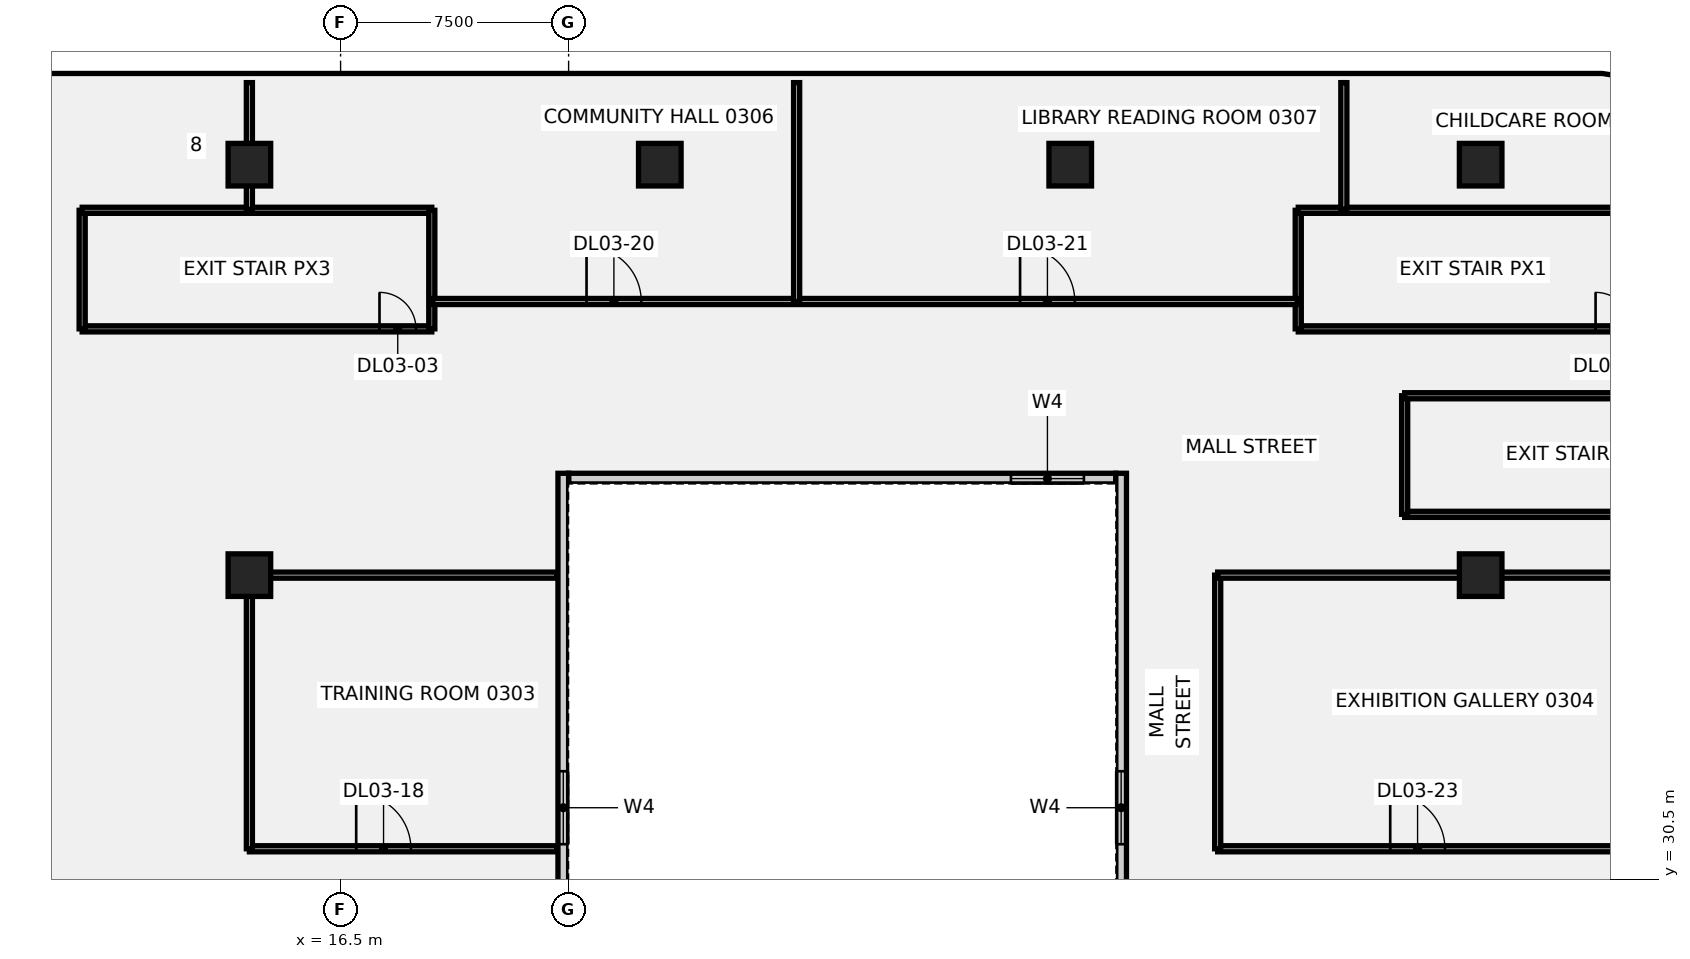
"""IFC4 building model, lengths in metres.
Left out: names, types, materials, properties, quantities, classifications, styles, units other than length and angle.
Written with IfcOpenShell. Run it as: python <this file> out.ifc"""

import sys

from ifc_helpers import new_model, si_unit, direction, frame, frame_2d, origin, origin_2d, place, context, subcontext, project, spatial, rectangle, extrude, element, fill, save


model = new_model("IFC4")
c1 = context("Model", 3, precision=1e-05, world=origin(), true_north=direction((0.0, 1.0)))
c2 = subcontext(c1, "Body", "Model", "MODEL_VIEW")
j1 = project(units=[si_unit("LENGTHUNIT", "METRE"), si_unit("PLANEANGLEUNIT", "RADIAN")], contexts=[c1])
p1 = place(None, origin())
s1 = spatial("IfcSite", under=j1, at=p1, CompositionType="ELEMENT")
p2 = place(p1, origin())
s2 = spatial("IfcBuilding", under=s1, at=p2, CompositionType="ELEMENT")
p3 = place(p2, frame((0.0, 0.0, 20.0)))
s3 = spatial("IfcBuildingStorey", under=s2, at=p3, CompositionType="ELEMENT", Elevation=20.0)
for number, where, z_axis, x_axis in (
    (1, (13.5, 40.5, -0.5), (0.0, 0.0, 1.0), (1.0, 0.0, 0.0)),
    (2, (13.5, 54.0, -0.5), (0.0, 0.0, 1.0), (1.0, 0.0, 0.0)),
    (3, (27.0, 54.0, -0.5), (0.0, 0.0, 1.0), (1.0, 0.0, 0.0)),
    (4, (40.5, 54.0, -0.5), (0.0, 0.0, 1.0), (1.0, 0.0, 0.0)),
    (5, (54.0, 40.5, -0.5), (0.0, 0.0, 1.0), (1.0, 0.0, 0.0)),
    (6, (54.0, 54.0, -0.5), (0.0, 0.0, 1.0), (1.0, 0.0, 0.0)),
):
    element("IfcColumn", number, at=place(p3, frame(where, z_axis=z_axis, x_axis=x_axis)), inside=s3, PredefinedType="COLUMN", context=c2, shape_type="SweptSolid", body=[
        extrude(rectangle(XDim=1.4, YDim=1.4, at=origin_2d()), origin(), (0.0, 0.0, 1.0), 5.05),
    ])
p4 = place(p3, frame((8.0, 48.6, 0.0), z_axis=(0.0, 0.0, 1.0), x_axis=(1.0, 0.0, 0.0)))
e7 = element("IfcWall", 7, at=p4, inside=s3, PredefinedType="PARTITIONING", context=c2, shape_type="SweptSolid", body=[
    extrude(rectangle(XDim=11.5, YDim=0.2, at=frame_2d((5.75, 0.0))), origin(), (0.0, 0.0, 1.0), 4.55),
])
p5 = place(p4, frame((9.78, 0.0, 0.0)))
e8 = element("IfcOpeningElement", 8, at=p5, cuts=e7, PredefinedType="OPENING", context=c2, shape_type="SweptSolid", body=[
    extrude(rectangle(XDim=1.2, YDim=2.1, at=frame_2d((0.6, 1.05))), frame((0.0, 0.11, 0.0), z_axis=(0.0, -1.0, 0.0), x_axis=(1.0, 0.0, 0.0)), (0.0, 0.0, 1.0), 0.22),
])
p6 = place(p3, frame((8.0, 48.6, 0.0), z_axis=(0.0, 0.0, 1.0), x_axis=(0.0, 1.0, 0.0)))
e9 = element("IfcWall", 9, at=p6, inside=s3, PredefinedType="PARTITIONING", context=c2, shape_type="SweptSolid", body=[
    extrude(rectangle(XDim=3.9, YDim=0.2, at=frame_2d((1.95, 0.0))), origin(), (0.0, 0.0, 1.0), 4.55),
])
p7 = place(p3, frame((8.0, 52.5, 0.0), z_axis=(0.0, 0.0, 1.0), x_axis=(1.0, 0.0, 0.0)))
e10 = element("IfcWall", 10, at=p7, inside=s3, PredefinedType="PARTITIONING", context=c2, shape_type="SweptSolid", body=[
    extrude(rectangle(XDim=11.5, YDim=0.2, at=frame_2d((5.75, 0.0))), origin(), (0.0, 0.0, 1.0), 4.55),
])
p8 = place(p3, frame((19.5, 48.6, 0.0), z_axis=(0.0, 0.0, 1.0), x_axis=(0.0, 1.0, 0.0)))
e11 = element("IfcWall", 11, at=p8, inside=s3, PredefinedType="PARTITIONING", context=c2, shape_type="SweptSolid", body=[
    extrude(rectangle(XDim=3.9, YDim=0.2, at=frame_2d((1.95, 0.0))), origin(), (0.0, 0.0, 1.0), 4.55),
])
p9 = place(p3, frame((48.0, 48.6, 0.0), z_axis=(0.0, 0.0, 1.0), x_axis=(1.0, 0.0, 0.0)))
e12 = element("IfcWall", 12, at=p9, inside=s3, PredefinedType="PARTITIONING", context=c2, shape_type="SweptSolid", body=[
    extrude(rectangle(XDim=11.5, YDim=0.2, at=frame_2d((5.75, 0.0))), origin(), (0.0, 0.0, 1.0), 4.55),
])
p10 = place(p9, frame((9.78, 0.0, 0.0)))
e13 = element("IfcOpeningElement", 13, at=p10, cuts=e12, PredefinedType="OPENING", context=c2, shape_type="SweptSolid", body=[
    extrude(rectangle(XDim=1.2, YDim=2.1, at=frame_2d((0.6, 1.05))), frame((0.0, 0.11, 0.0), z_axis=(0.0, -1.0, 0.0), x_axis=(1.0, 0.0, 0.0)), (0.0, 0.0, 1.0), 0.22),
])
p11 = place(p3, frame((48.0, 48.6, 0.0), z_axis=(0.0, 0.0, 1.0), x_axis=(0.0, 1.0, 0.0)))
e14 = element("IfcWall", 14, at=p11, inside=s3, PredefinedType="PARTITIONING", context=c2, shape_type="SweptSolid", body=[
    extrude(rectangle(XDim=3.9, YDim=0.2, at=frame_2d((1.95, 0.0))), origin(), (0.0, 0.0, 1.0), 4.55),
])
for number, where, z_axis, x_axis in (
    (15, (48.0, 52.5, 0.0), (0.0, 0.0, 1.0), (1.0, 0.0, 0.0)),
    (16, (51.5, 42.5, 0.0), (0.0, 0.0, 1.0), (1.0, 0.0, 0.0)),
):
    element("IfcWall", number, at=place(p3, frame(where, z_axis=z_axis, x_axis=x_axis)), inside=s3, PredefinedType="PARTITIONING", context=c2, shape_type="SweptSolid", body=[
        extrude(rectangle(XDim=11.5, YDim=0.2, at=frame_2d((5.75, 0.0))), origin(), (0.0, 0.0, 1.0), 4.55),
    ])
p12 = place(p3, frame((51.5, 42.5, 0.0), z_axis=(0.0, 0.0, 1.0), x_axis=(0.0, 1.0, 0.0)))
e17 = element("IfcWall", 17, at=p12, inside=s3, PredefinedType="PARTITIONING", context=c2, shape_type="SweptSolid", body=[
    extrude(rectangle(XDim=3.9, YDim=0.2, at=frame_2d((1.95, 0.0))), origin(), (0.0, 0.0, 1.0), 4.55),
])
p13 = place(p3, frame((51.5, 46.4, 0.0), z_axis=(0.0, 0.0, 1.0), x_axis=(1.0, 0.0, 0.0)))
e18 = element("IfcWall", 18, at=p13, inside=s3, PredefinedType="PARTITIONING", context=c2, shape_type="SweptSolid", body=[
    extrude(rectangle(XDim=11.5, YDim=0.2, at=frame_2d((5.75, 0.0))), origin(), (0.0, 0.0, 1.0), 4.55),
])
p14 = place(p3, frame((13.5, 52.53, 0.0), z_axis=(0.0, 0.0, 1.0), x_axis=(0.0, 1.0, 0.0)))
e19 = element("IfcWall", 19, at=p14, inside=s3, PredefinedType="PARTITIONING", context=c2, shape_type="SweptSolid", body=[
    extrude(rectangle(XDim=4.169, YDim=0.2, at=frame_2d((2.084, 0.0))), origin(), (0.0, 0.0, 1.0), 4.55),
])
p15 = place(p3, frame((19.53, 49.5, 0.0), z_axis=(0.0, 0.0, 1.0), x_axis=(1.0, 0.0, 0.0)))
e20 = element("IfcWall", 20, at=p15, inside=s3, PredefinedType="PARTITIONING", context=c2, shape_type="SweptSolid", body=[
    extrude(rectangle(XDim=28.44, YDim=0.2, at=frame_2d((14.22, 0.0))), origin(), (0.0, 0.0, 1.0), 4.55),
])
p16 = place(p15, frame((5.06, 0.0, 0.0)))
e21 = element("IfcOpeningElement", 21, at=p16, cuts=e20, PredefinedType="OPENING", context=c2, shape_type="SweptSolid", body=[
    extrude(rectangle(XDim=1.8, YDim=2.1, at=frame_2d((0.9, 1.05))), frame((0.0, 0.11, 0.0), z_axis=(0.0, -1.0, 0.0), x_axis=(1.0, 0.0, 0.0)), (0.0, 0.0, 1.0), 0.22),
])
p17 = place(p15, frame((19.32, 0.0, 0.0)))
e22 = element("IfcOpeningElement", 22, at=p17, cuts=e20, PredefinedType="OPENING", context=c2, shape_type="SweptSolid", body=[
    extrude(rectangle(XDim=1.8, YDim=2.1, at=frame_2d((0.9, 1.05))), frame((0.0, 0.11, 0.0), z_axis=(0.0, -1.0, 0.0), x_axis=(1.0, 0.0, 0.0)), (0.0, 0.0, 1.0), 0.22),
])
p18 = place(p3, frame((13.5, 31.5, 0.0), z_axis=(0.0, 0.0, 1.0), x_axis=(1.0, 0.0, 0.0)))
e23 = element("IfcWall", 23, at=p18, inside=s3, PredefinedType="PARTITIONING", context=c2, shape_type="SweptSolid", body=[
    extrude(rectangle(XDim=10.12, YDim=0.2, at=frame_2d((5.06, 0.0))), origin(), (0.0, 0.0, 1.0), 4.55),
])
p19 = place(p18, frame((3.513, 0.0, 0.0)))
e24 = element("IfcOpeningElement", 24, at=p19, cuts=e23, PredefinedType="OPENING", context=c2, shape_type="SweptSolid", body=[
    extrude(rectangle(XDim=1.8, YDim=2.1, at=frame_2d((0.9, 1.05))), frame((0.0, 0.11, 0.0), z_axis=(0.0, -1.0, 0.0), x_axis=(1.0, 0.0, 0.0)), (0.0, 0.0, 1.0), 0.22),
])
p20 = place(p3, frame((13.5, 31.5, 0.0), z_axis=(0.0, 0.0, 1.0), x_axis=(0.0, 1.0, 0.0)))
e25 = element("IfcWall", 25, at=p20, inside=s3, PredefinedType="PARTITIONING", context=c2, shape_type="SweptSolid", body=[
    extrude(rectangle(XDim=9.0, YDim=0.2, at=frame_2d((4.5, 0.0))), origin(), (0.0, 0.0, 1.0), 4.55),
])
p21 = place(p3, frame((13.5, 40.5, 0.0), z_axis=(0.0, 0.0, 1.0), x_axis=(1.0, 0.0, 0.0)))
e26 = element("IfcWall", 26, at=p21, inside=s3, PredefinedType="PARTITIONING", context=c2, shape_type="SweptSolid", body=[
    extrude(rectangle(XDim=10.12, YDim=0.2, at=frame_2d((5.06, 0.0))), origin(), (0.0, 0.0, 1.0), 4.55),
])
p22 = place(p3, frame((31.5, 49.5, 0.0), z_axis=(0.0, 0.0, 1.0), x_axis=(0.0, 1.0, 0.0)))
e27 = element("IfcWall", 27, at=p22, inside=s3, PredefinedType="PARTITIONING", context=c2, shape_type="SweptSolid", body=[
    extrude(rectangle(XDim=7.199, YDim=0.2, at=frame_2d((3.6, 0.0))), origin(), (0.0, 0.0, 1.0), 4.55),
])
p23 = place(p3, frame((49.5, 52.53, 0.0), z_axis=(0.0, 0.0, 1.0), x_axis=(0.0, 1.0, 0.0)))
e28 = element("IfcWall", 28, at=p23, inside=s3, PredefinedType="PARTITIONING", context=c2, shape_type="SweptSolid", body=[
    extrude(rectangle(XDim=4.169, YDim=0.2, at=frame_2d((2.084, 0.0))), origin(), (0.0, 0.0, 1.0), 4.55),
])
p24 = place(p3, frame((45.35, 31.5, 0.0), z_axis=(0.0, 0.0, 1.0), x_axis=(1.0, 0.0, 0.0)))
e29 = element("IfcWall", 29, at=p24, inside=s3, PredefinedType="PARTITIONING", context=c2, shape_type="SweptSolid", body=[
    extrude(rectangle(XDim=18.349, YDim=0.2, at=frame_2d((9.174, 0.0))), origin(), (0.0, 0.0, 1.0), 4.55),
])
p25 = place(p24, frame((14.85, 0.0, 0.0)))
e30 = element("IfcOpeningElement", 30, at=p25, cuts=e29, PredefinedType="OPENING", context=c2, shape_type="SweptSolid", body=[
    extrude(rectangle(XDim=1.8, YDim=2.1, at=frame_2d((0.9, 1.05))), frame((0.0, 0.11, 0.0), z_axis=(0.0, -1.0, 0.0), x_axis=(1.0, 0.0, 0.0)), (0.0, 0.0, 1.0), 0.22),
])
p26 = place(p24, frame((5.675, 0.0, 0.0)))
e31 = element("IfcOpeningElement", 31, at=p26, cuts=e29, PredefinedType="OPENING", context=c2, shape_type="SweptSolid", body=[
    extrude(rectangle(XDim=1.8, YDim=2.1, at=frame_2d((0.9, 1.05))), frame((0.0, 0.11, 0.0), z_axis=(0.0, -1.0, 0.0), x_axis=(1.0, 0.0, 0.0)), (0.0, 0.0, 1.0), 0.22),
])
p27 = place(p3, frame((45.35, 31.5, 0.0), z_axis=(0.0, 0.0, 1.0), x_axis=(0.0, 1.0, 0.0)))
e32 = element("IfcWall", 32, at=p27, inside=s3, PredefinedType="PARTITIONING", context=c2, shape_type="SweptSolid", body=[
    extrude(rectangle(XDim=9.0, YDim=0.2, at=frame_2d((4.5, 0.0))), origin(), (0.0, 0.0, 1.0), 4.55),
])
p28 = place(p3, frame((45.35, 40.5, 0.0), z_axis=(0.0, 0.0, 1.0), x_axis=(1.0, 0.0, 0.0)))
e33 = element("IfcWall", 33, at=p28, inside=s3, PredefinedType="PARTITIONING", context=c2, shape_type="SweptSolid", body=[
    extrude(rectangle(XDim=18.349, YDim=0.2, at=frame_2d((9.174, 0.0))), origin(), (0.0, 0.0, 1.0), 4.55),
])
p29 = place(p3, frame((24.0, 43.675, 0.0), z_axis=(0.0, 0.0, 1.0), x_axis=(1.0, 0.0, 0.0)))
e34 = element("IfcWall", 34, at=p29, inside=s3, PredefinedType="SOLIDWALL", context=c2, shape_type="SweptSolid", body=[
    extrude(rectangle(XDim=18.0, YDim=0.35, at=frame_2d((9.0, 0.0))), origin(), (0.0, 0.0, 1.0), 4.55),
])
p30 = place(p29, frame((14.55, 0.0, 1.0)))
e35 = element("IfcOpeningElement", 35, at=p30, cuts=e34, PredefinedType="OPENING", context=c2, shape_type="SweptSolid", body=[
    extrude(rectangle(XDim=2.4, YDim=1.8, at=frame_2d((1.2, 0.9))), frame((0.0, 0.185, 0.0), z_axis=(0.0, -1.0, 0.0), x_axis=(1.0, 0.0, 0.0)), (0.0, 0.0, 1.0), 0.37),
])
p31 = place(p3, frame((23.825, 16.45, 0.0), z_axis=(0.0, 0.0, 1.0), x_axis=(0.0, 1.0, 0.0)))
e36 = element("IfcWall", 36, at=p31, inside=s3, PredefinedType="SOLIDWALL", context=c2, shape_type="SweptSolid", body=[
    extrude(rectangle(XDim=27.4, YDim=0.35, at=frame_2d((13.7, 0.0))), origin(), (0.0, 0.0, 1.0), 4.55),
])
p32 = place(p31, frame((15.2, 0.0, 1.0)))
e37 = element("IfcOpeningElement", 37, at=p32, cuts=e36, PredefinedType="OPENING", context=c2, shape_type="SweptSolid", body=[
    extrude(rectangle(XDim=2.4, YDim=1.8, at=frame_2d((1.2, 0.9))), frame((0.0, 0.185, 0.0), z_axis=(0.0, -1.0, 0.0), x_axis=(1.0, 0.0, 0.0)), (0.0, 0.0, 1.0), 0.37),
])
p33 = place(p3, frame((42.175, 16.45, 0.0), z_axis=(0.0, 0.0, 1.0), x_axis=(0.0, 1.0, 0.0)))
e38 = element("IfcWall", 38, at=p33, inside=s3, PredefinedType="SOLIDWALL", context=c2, shape_type="SweptSolid", body=[
    extrude(rectangle(XDim=27.4, YDim=0.35, at=frame_2d((13.7, 0.0))), origin(), (0.0, 0.0, 1.0), 4.55),
])
p34 = place(p33, frame((15.2, 0.0, 1.0)))
e39 = element("IfcOpeningElement", 39, at=p34, cuts=e38, PredefinedType="OPENING", context=c2, shape_type="SweptSolid", body=[
    extrude(rectangle(XDim=2.4, YDim=1.8, at=frame_2d((1.2, 0.9))), frame((0.0, 0.185, 0.0), z_axis=(0.0, -1.0, 0.0), x_axis=(1.0, 0.0, 0.0)), (0.0, 0.0, 1.0), 0.37),
])
p35 = place(p10, origin())
e40 = element("IfcDoor", 40, at=p35, inside=s3, OperationType="SINGLE_SWING_LEFT", PredefinedType="DOOR", context=c2, shape_type="SweptSolid", body=[
    extrude(rectangle(XDim=1.2, YDim=2.1, at=frame_2d((0.6, 1.05))), frame((0.0, 0.025, 0.0), z_axis=(0.0, -1.0, 0.0), x_axis=(1.0, 0.0, 0.0)), (0.0, 0.0, 1.0), 0.05),
])
fill(e13, e40)
p36 = place(p5, origin())
e41 = element("IfcDoor", 41, at=p36, inside=s3, OperationType="SINGLE_SWING_LEFT", PredefinedType="DOOR", context=c2, shape_type="SweptSolid", body=[
    extrude(rectangle(XDim=1.2, YDim=2.1, at=frame_2d((0.6, 1.05))), frame((0.0, 0.025, 0.0), z_axis=(0.0, -1.0, 0.0), x_axis=(1.0, 0.0, 0.0)), (0.0, 0.0, 1.0), 0.05),
])
fill(e8, e41)
p37 = place(p19, origin())
e42 = element("IfcDoor", 42, at=p37, inside=s3, OperationType="SINGLE_SWING_RIGHT", PredefinedType="DOOR", context=c2, shape_type="SweptSolid", body=[
    extrude(rectangle(XDim=1.8, YDim=2.1, at=frame_2d((0.9, 1.05))), frame((0.0, 0.025, 0.0), z_axis=(0.0, -1.0, 0.0), x_axis=(1.0, 0.0, 0.0)), (0.0, 0.0, 1.0), 0.05),
])
fill(e24, e42)
p38 = place(p16, origin())
e43 = element("IfcDoor", 43, at=p38, inside=s3, OperationType="SINGLE_SWING_RIGHT", PredefinedType="DOOR", context=c2, shape_type="SweptSolid", body=[
    extrude(rectangle(XDim=1.8, YDim=2.1, at=frame_2d((0.9, 1.05))), frame((0.0, 0.025, 0.0), z_axis=(0.0, -1.0, 0.0), x_axis=(1.0, 0.0, 0.0)), (0.0, 0.0, 1.0), 0.05),
])
fill(e21, e43)
p39 = place(p17, origin())
e44 = element("IfcDoor", 44, at=p39, inside=s3, OperationType="SINGLE_SWING_LEFT", PredefinedType="DOOR", context=c2, shape_type="SweptSolid", body=[
    extrude(rectangle(XDim=1.8, YDim=2.1, at=frame_2d((0.9, 1.05))), frame((0.0, 0.025, 0.0), z_axis=(0.0, -1.0, 0.0), x_axis=(1.0, 0.0, 0.0)), (0.0, 0.0, 1.0), 0.05),
])
fill(e22, e44)
p40 = place(p26, origin())
e45 = element("IfcDoor", 45, at=p40, inside=s3, OperationType="SINGLE_SWING_LEFT", PredefinedType="DOOR", context=c2, shape_type="SweptSolid", body=[
    extrude(rectangle(XDim=1.8, YDim=2.1, at=frame_2d((0.9, 1.05))), frame((0.0, 0.025, 0.0), z_axis=(0.0, -1.0, 0.0), x_axis=(1.0, 0.0, 0.0)), (0.0, 0.0, 1.0), 0.05),
])
fill(e31, e45)
p41 = place(p30, origin())
e46 = element("IfcWindow", 46, at=p41, inside=s3, PartitioningType="SINGLE_PANEL", PredefinedType="WINDOW", context=c2, shape_type="SweptSolid", body=[
    extrude(rectangle(XDim=2.4, YDim=1.8, at=frame_2d((1.2, 0.9))), frame((0.0, 0.03, 0.0), z_axis=(0.0, -1.0, 0.0), x_axis=(1.0, 0.0, 0.0)), (0.0, 0.0, 1.0), 0.06),
])
fill(e35, e46)
p42 = place(p32, origin())
e47 = element("IfcWindow", 47, at=p42, inside=s3, PartitioningType="SINGLE_PANEL", PredefinedType="WINDOW", context=c2, shape_type="SweptSolid", body=[
    extrude(rectangle(XDim=2.4, YDim=1.8, at=frame_2d((1.2, 0.9))), frame((0.0, 0.03, 0.0), z_axis=(0.0, -1.0, 0.0), x_axis=(1.0, 0.0, 0.0)), (0.0, 0.0, 1.0), 0.06),
])
fill(e37, e47)
p43 = place(p34, origin())
e48 = element("IfcWindow", 48, at=p43, inside=s3, PartitioningType="SINGLE_PANEL", PredefinedType="WINDOW", context=c2, shape_type="SweptSolid", body=[
    extrude(rectangle(XDim=2.4, YDim=1.8, at=frame_2d((1.2, 0.9))), frame((0.0, 0.03, 0.0), z_axis=(0.0, -1.0, 0.0), x_axis=(1.0, 0.0, 0.0)), (0.0, 0.0, 1.0), 0.06),
])
fill(e39, e48)
save(model, sys.argv[1])
